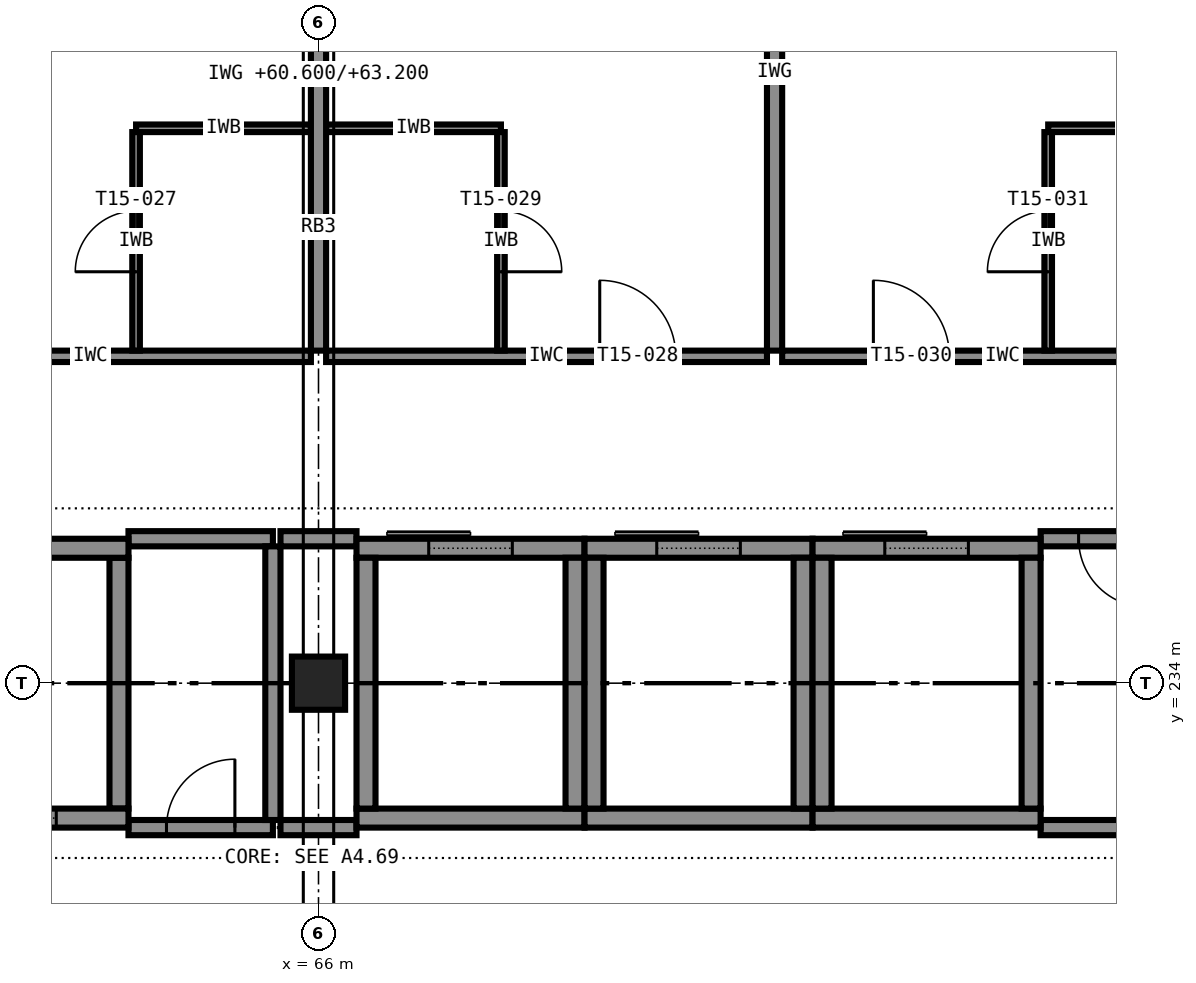
"""IFC4 building model, lengths in metres.
Left out: names, types, materials, properties, quantities, classifications, styles, units other than length and angle.
Written with IfcOpenShell. Run it as: python <this file> out.ifc"""

import sys

from ifc_helpers import new_model, si_unit, direction, frame, frame_2d, origin, origin_2d, place, context, subcontext, project, spatial, rectangle, extrude, element, fill, save


model = new_model("IFC4")
c1 = context("Model", 3, precision=1e-05, world=origin(), true_north=direction((0.0, 1.0)))
c2 = subcontext(c1, "Body", "Model", "MODEL_VIEW")
j1 = project(units=[si_unit("LENGTHUNIT", "METRE"), si_unit("PLANEANGLEUNIT", "RADIAN")], contexts=[c1])
p1 = place(None, origin())
s1 = spatial("IfcSite", under=j1, at=p1, CompositionType="ELEMENT")
p2 = place(p1, origin())
s2 = spatial("IfcBuilding", under=s1, at=p2, CompositionType="ELEMENT")
p3 = place(p2, frame((0.0, 0.0, 60.6)))
s3 = spatial("IfcBuildingStorey", under=s2, at=p3, CompositionType="ELEMENT", Elevation=60.6)
p4 = place(p3, frame((66.0, 234.0, 0.0), z_axis=(0.0, 0.0, 1.0), x_axis=(1.0, 0.0, 0.0)))
e1 = element("IfcColumn", 1, at=p4, inside=s3, PredefinedType="COLUMN", context=c2, shape_type="SweptSolid", body=[
    extrude(rectangle(XDim=0.7, YDim=0.7, at=origin_2d()), origin(), (0.0, 0.0, 1.0), 3.6),
])
p5 = place(p3, frame((60.5, 232.225, 0.0), z_axis=(0.0, 0.0, 1.0), x_axis=(1.0, 0.0, 0.0)))
e2 = element("IfcWall", 2, at=p5, inside=s3, PredefinedType="SHEAR", context=c2, shape_type="SweptSolid", body=[
    extrude(rectangle(XDim=3.0, YDim=0.25, at=frame_2d((1.5, 0.0))), origin(), (0.0, 0.0, 1.0), 3.6),
])
p6 = place(p5, frame((0.95, 0.0, 0.0)))
e3 = element("IfcOpeningElement", 3, at=p6, cuts=e2, PredefinedType="OPENING", context=c2, shape_type="SweptSolid", body=[
    extrude(rectangle(XDim=1.1, YDim=2.1, at=frame_2d((0.55, 1.05))), frame((0.0, 0.135, 0.0), z_axis=(0.0, -1.0, 0.0), x_axis=(1.0, 0.0, 0.0)), (0.0, 0.0, 1.0), 0.27),
])
p7 = place(p3, frame((60.5, 235.775, 0.0), z_axis=(0.0, 0.0, 1.0), x_axis=(1.0, 0.0, 0.0)))
e4 = element("IfcWall", 4, at=p7, inside=s3, PredefinedType="SHEAR", context=c2, shape_type="SweptSolid", body=[
    extrude(rectangle(XDim=3.0, YDim=0.25, at=frame_2d((1.5, 0.0))), origin(), (0.0, 0.0, 1.0), 3.6),
])
p8 = place(p3, frame((63.375, 232.35, 0.0), z_axis=(0.0, 0.0, 1.0), x_axis=(0.0, 1.0, 0.0)))
e5 = element("IfcWall", 5, at=p8, inside=s3, PredefinedType="SHEAR", context=c2, shape_type="SweptSolid", body=[
    extrude(rectangle(XDim=3.3, YDim=0.25, at=frame_2d((1.65, 0.0))), origin(), (0.0, 0.0, 1.0), 3.6),
])
p9 = place(p3, frame((66.5, 232.225, 0.0), z_axis=(0.0, 0.0, 1.0), x_axis=(1.0, 0.0, 0.0)))
e6 = element("IfcWall", 6, at=p9, inside=s3, PredefinedType="SHEAR", context=c2, shape_type="SweptSolid", body=[
    extrude(rectangle(XDim=3.0, YDim=0.25, at=frame_2d((1.5, 0.0))), origin(), (0.0, 0.0, 1.0), 3.6),
])
p10 = place(p3, frame((66.5, 235.775, 0.0), z_axis=(0.0, 0.0, 1.0), x_axis=(1.0, 0.0, 0.0)))
e7 = element("IfcWall", 7, at=p10, inside=s3, PredefinedType="SHEAR", context=c2, shape_type="SweptSolid", body=[
    extrude(rectangle(XDim=3.0, YDim=0.25, at=frame_2d((1.5, 0.0))), origin(), (0.0, 0.0, 1.0), 3.6),
])
p11 = place(p10, frame((0.95, 0.0, 0.0)))
e8 = element("IfcOpeningElement", 8, at=p11, cuts=e7, PredefinedType="OPENING", context=c2, shape_type="SweptSolid", body=[
    extrude(rectangle(XDim=1.1, YDim=2.1, at=frame_2d((0.55, 1.05))), frame((0.0, 0.135, 0.0), z_axis=(0.0, -1.0, 0.0), x_axis=(1.0, 0.0, 0.0)), (0.0, 0.0, 1.0), 0.27),
])
for number, where, z_axis, x_axis in (
    (9, (66.625, 232.35, 0.0), (0.0, 0.0, 1.0), (0.0, 1.0, 0.0)),
    (10, (69.375, 232.35, 0.0), (0.0, 0.0, 1.0), (0.0, 1.0, 0.0)),
):
    element("IfcWall", number, at=place(p3, frame(where, z_axis=z_axis, x_axis=x_axis)), inside=s3, PredefinedType="SHEAR", context=c2, shape_type="SweptSolid", body=[
        extrude(rectangle(XDim=3.3, YDim=0.25, at=frame_2d((1.65, 0.0))), origin(), (0.0, 0.0, 1.0), 3.6),
    ])
p12 = place(p3, frame((69.5, 232.225, 0.0), z_axis=(0.0, 0.0, 1.0), x_axis=(1.0, 0.0, 0.0)))
e11 = element("IfcWall", 11, at=p12, inside=s3, PredefinedType="SHEAR", context=c2, shape_type="SweptSolid", body=[
    extrude(rectangle(XDim=3.0, YDim=0.25, at=frame_2d((1.5, 0.0))), origin(), (0.0, 0.0, 1.0), 3.6),
])
p13 = place(p3, frame((69.5, 235.775, 0.0), z_axis=(0.0, 0.0, 1.0), x_axis=(1.0, 0.0, 0.0)))
e12 = element("IfcWall", 12, at=p13, inside=s3, PredefinedType="SHEAR", context=c2, shape_type="SweptSolid", body=[
    extrude(rectangle(XDim=3.0, YDim=0.25, at=frame_2d((1.5, 0.0))), origin(), (0.0, 0.0, 1.0), 3.6),
])
p14 = place(p13, frame((0.95, 0.0, 0.0)))
e13 = element("IfcOpeningElement", 13, at=p14, cuts=e12, PredefinedType="OPENING", context=c2, shape_type="SweptSolid", body=[
    extrude(rectangle(XDim=1.1, YDim=2.1, at=frame_2d((0.55, 1.05))), frame((0.0, 0.135, 0.0), z_axis=(0.0, -1.0, 0.0), x_axis=(1.0, 0.0, 0.0)), (0.0, 0.0, 1.0), 0.27),
])
for number, where, z_axis, x_axis in (
    (14, (69.625, 232.35, 0.0), (0.0, 0.0, 1.0), (0.0, 1.0, 0.0)),
    (15, (72.375, 232.35, 0.0), (0.0, 0.0, 1.0), (0.0, 1.0, 0.0)),
):
    element("IfcWall", number, at=place(p3, frame(where, z_axis=z_axis, x_axis=x_axis)), inside=s3, PredefinedType="SHEAR", context=c2, shape_type="SweptSolid", body=[
        extrude(rectangle(XDim=3.3, YDim=0.25, at=frame_2d((1.65, 0.0))), origin(), (0.0, 0.0, 1.0), 3.6),
    ])
p15 = place(p3, frame((72.5, 232.225, 0.0), z_axis=(0.0, 0.0, 1.0), x_axis=(1.0, 0.0, 0.0)))
e16 = element("IfcWall", 16, at=p15, inside=s3, PredefinedType="SHEAR", context=c2, shape_type="SweptSolid", body=[
    extrude(rectangle(XDim=3.0, YDim=0.25, at=frame_2d((1.5, 0.0))), origin(), (0.0, 0.0, 1.0), 3.6),
])
p16 = place(p3, frame((72.5, 235.775, 0.0), z_axis=(0.0, 0.0, 1.0), x_axis=(1.0, 0.0, 0.0)))
e17 = element("IfcWall", 17, at=p16, inside=s3, PredefinedType="SHEAR", context=c2, shape_type="SweptSolid", body=[
    extrude(rectangle(XDim=3.0, YDim=0.25, at=frame_2d((1.5, 0.0))), origin(), (0.0, 0.0, 1.0), 3.6),
])
p17 = place(p16, frame((0.95, 0.0, 0.0)))
e18 = element("IfcOpeningElement", 18, at=p17, cuts=e17, PredefinedType="OPENING", context=c2, shape_type="SweptSolid", body=[
    extrude(rectangle(XDim=1.1, YDim=2.1, at=frame_2d((0.55, 1.05))), frame((0.0, 0.135, 0.0), z_axis=(0.0, -1.0, 0.0), x_axis=(1.0, 0.0, 0.0)), (0.0, 0.0, 1.0), 0.27),
])
for number, where, z_axis, x_axis in (
    (19, (72.625, 232.35, 0.0), (0.0, 0.0, 1.0), (0.0, 1.0, 0.0)),
    (20, (75.375, 232.35, 0.0), (0.0, 0.0, 1.0), (0.0, 1.0, 0.0)),
):
    element("IfcWall", number, at=place(p3, frame(where, z_axis=z_axis, x_axis=x_axis)), inside=s3, PredefinedType="SHEAR", context=c2, shape_type="SweptSolid", body=[
        extrude(rectangle(XDim=3.3, YDim=0.25, at=frame_2d((1.65, 0.0))), origin(), (0.0, 0.0, 1.0), 3.6),
    ])
p18 = place(p3, frame((63.5, 232.1, 0.0), z_axis=(0.0, 0.0, 1.0), x_axis=(1.0, 0.0, 0.0)))
e21 = element("IfcWall", 21, at=p18, inside=s3, PredefinedType="PARTITIONING", context=c2, shape_type="SweptSolid", body=[
    extrude(rectangle(XDim=1.9, YDim=0.2, at=frame_2d((0.95, 0.0))), origin(), (0.0, 0.0, 1.0), 3.4),
])
p19 = place(p18, frame((0.5, 0.0, 0.0)))
e22 = element("IfcOpeningElement", 22, at=p19, cuts=e21, PredefinedType="OPENING", context=c2, shape_type="SweptSolid", body=[
    extrude(rectangle(XDim=0.9, YDim=2.1, at=frame_2d((0.45, 1.05))), frame((0.0, 0.11, 0.0), z_axis=(0.0, -1.0, 0.0), x_axis=(1.0, 0.0, 0.0)), (0.0, 0.0, 1.0), 0.22),
])
p20 = place(p3, frame((65.5, 232.1, 0.0), z_axis=(0.0, 0.0, 1.0), x_axis=(1.0, 0.0, 0.0)))
e23 = element("IfcWall", 23, at=p20, inside=s3, PredefinedType="PARTITIONING", context=c2, shape_type="SweptSolid", body=[
    extrude(rectangle(XDim=1.0, YDim=0.2, at=frame_2d((0.5, 0.0))), origin(), (0.0, 0.0, 1.0), 3.4),
])
for number, where, z_axis, x_axis in (
    (24, (75.5, 232.1, 0.0), (0.0, 0.0, 1.0), (1.0, 0.0, 0.0)),
    (25, (63.5, 235.9, 0.0), (0.0, 0.0, 1.0), (1.0, 0.0, 0.0)),
):
    element("IfcWall", number, at=place(p3, frame(where, z_axis=z_axis, x_axis=x_axis)), inside=s3, PredefinedType="PARTITIONING", context=c2, shape_type="SweptSolid", body=[
        extrude(rectangle(XDim=1.9, YDim=0.2, at=frame_2d((0.95, 0.0))), origin(), (0.0, 0.0, 1.0), 3.4),
    ])
p21 = place(p3, frame((65.5, 235.9, 0.0), z_axis=(0.0, 0.0, 1.0), x_axis=(1.0, 0.0, 0.0)))
e26 = element("IfcWall", 26, at=p21, inside=s3, PredefinedType="PARTITIONING", context=c2, shape_type="SweptSolid", body=[
    extrude(rectangle(XDim=1.0, YDim=0.2, at=frame_2d((0.5, 0.0))), origin(), (0.0, 0.0, 1.0), 3.4),
])
p22 = place(p3, frame((77.4, 235.9, 0.0), z_axis=(0.0, 0.0, 1.0), x_axis=(-1.0, 0.0, 0.0)))
e27 = element("IfcWall", 27, at=p22, inside=s3, PredefinedType="PARTITIONING", context=c2, shape_type="SweptSolid", body=[
    extrude(rectangle(XDim=1.9, YDim=0.2, at=frame_2d((0.95, 0.0))), origin(), (0.0, 0.0, 1.0), 3.4),
])
p23 = place(p22, frame((0.5, 0.0, 0.0)))
e28 = element("IfcOpeningElement", 28, at=p23, cuts=e27, PredefinedType="OPENING", context=c2, shape_type="SweptSolid", body=[
    extrude(rectangle(XDim=0.9, YDim=2.1, at=frame_2d((0.45, 1.05))), frame((0.0, 0.11, 0.0), z_axis=(0.0, -1.0, 0.0), x_axis=(1.0, 0.0, 0.0)), (0.0, 0.0, 1.0), 0.22),
])
p24 = place(p3, frame((65.4, 232.2, 0.0), z_axis=(0.0, 0.0, 1.0), x_axis=(0.0, 1.0, 0.0)))
e29 = element("IfcWall", 29, at=p24, inside=s3, PredefinedType="PARTITIONING", context=c2, shape_type="SweptSolid", body=[
    extrude(rectangle(XDim=3.6, YDim=0.2, at=frame_2d((1.8, 0.0))), origin(), (0.0, 0.0, 1.0), 3.4),
])
p25 = place(p3, frame((60.1, 238.3, 0.0), z_axis=(0.0, 0.0, 1.0), x_axis=(1.0, 0.0, 0.0)))
e30 = element("IfcWall", 30, at=p25, inside=s3, PredefinedType="PARTITIONING", context=c2, shape_type="SweptSolid", body=[
    extrude(rectangle(XDim=5.8, YDim=0.15, at=frame_2d((2.9, 0.0))), origin(), (0.0, 0.0, 1.0), 3.4),
])
p26 = place(p25, frame((1.2, 0.0, 0.0)))
e31 = element("IfcOpeningElement", 31, at=p26, cuts=e30, PredefinedType="OPENING", context=c2, shape_type="SweptSolid", body=[
    extrude(rectangle(XDim=1.0, YDim=2.1, at=frame_2d((0.5, 1.05))), frame((0.0, 0.085, 0.0), z_axis=(0.0, -1.0, 0.0), x_axis=(1.0, 0.0, 0.0)), (0.0, 0.0, 1.0), 0.17),
])
p27 = place(p3, frame((63.6, 241.3, 0.0), z_axis=(0.0, 0.0, 1.0), x_axis=(1.0, 0.0, 0.0)))
e32 = element("IfcWall", 32, at=p27, inside=s3, PredefinedType="PARTITIONING", context=c2, shape_type="SweptSolid", body=[
    extrude(rectangle(XDim=2.3, YDim=0.1, at=frame_2d((1.15, 0.0))), origin(), (0.0, 0.0, 1.0), 3.4),
])
p28 = place(p3, frame((63.6, 238.375, 0.0), z_axis=(0.0, 0.0, 1.0), x_axis=(0.0, 1.0, 0.0)))
e33 = element("IfcWall", 33, at=p28, inside=s3, PredefinedType="PARTITIONING", context=c2, shape_type="SweptSolid", body=[
    extrude(rectangle(XDim=2.875, YDim=0.1, at=frame_2d((1.438, 0.0))), origin(), (0.0, 0.0, 1.0), 3.4),
])
p29 = place(p28, frame((1.038, 0.0, 0.0)))
e34 = element("IfcOpeningElement", 34, at=p29, cuts=e33, PredefinedType="OPENING", context=c2, shape_type="SweptSolid", body=[
    extrude(rectangle(XDim=0.8, YDim=2.1, at=frame_2d((0.4, 1.05))), frame((0.0, 0.06, 0.0), z_axis=(0.0, -1.0, 0.0), x_axis=(1.0, 0.0, 0.0)), (0.0, 0.0, 1.0), 0.12),
])
p30 = place(p3, frame((66.1, 238.3, 0.0), z_axis=(0.0, 0.0, 1.0), x_axis=(1.0, 0.0, 0.0)))
e35 = element("IfcWall", 35, at=p30, inside=s3, PredefinedType="PARTITIONING", context=c2, shape_type="SweptSolid", body=[
    extrude(rectangle(XDim=5.8, YDim=0.15, at=frame_2d((2.9, 0.0))), origin(), (0.0, 0.0, 1.0), 3.4),
])
p31 = place(p30, frame((3.6, 0.0, 0.0)))
e36 = element("IfcOpeningElement", 36, at=p31, cuts=e35, PredefinedType="OPENING", context=c2, shape_type="SweptSolid", body=[
    extrude(rectangle(XDim=1.0, YDim=2.1, at=frame_2d((0.5, 1.05))), frame((0.0, 0.085, 0.0), z_axis=(0.0, -1.0, 0.0), x_axis=(1.0, 0.0, 0.0)), (0.0, 0.0, 1.0), 0.17),
])
p32 = place(p3, frame((66.1, 241.3, 0.0), z_axis=(0.0, 0.0, 1.0), x_axis=(1.0, 0.0, 0.0)))
e37 = element("IfcWall", 37, at=p32, inside=s3, PredefinedType="PARTITIONING", context=c2, shape_type="SweptSolid", body=[
    extrude(rectangle(XDim=2.3, YDim=0.1, at=frame_2d((1.15, 0.0))), origin(), (0.0, 0.0, 1.0), 3.4),
])
p33 = place(p3, frame((68.4, 241.25, 0.0), z_axis=(0.0, 0.0, 1.0), x_axis=(0.0, -1.0, 0.0)))
e38 = element("IfcWall", 38, at=p33, inside=s3, PredefinedType="PARTITIONING", context=c2, shape_type="SweptSolid", body=[
    extrude(rectangle(XDim=2.875, YDim=0.1, at=frame_2d((1.438, 0.0))), origin(), (0.0, 0.0, 1.0), 3.4),
])
p34 = place(p33, frame((1.038, 0.0, 0.0)))
e39 = element("IfcOpeningElement", 39, at=p34, cuts=e38, PredefinedType="OPENING", context=c2, shape_type="SweptSolid", body=[
    extrude(rectangle(XDim=0.8, YDim=2.1, at=frame_2d((0.4, 1.05))), frame((0.0, 0.06, 0.0), z_axis=(0.0, -1.0, 0.0), x_axis=(1.0, 0.0, 0.0)), (0.0, 0.0, 1.0), 0.12),
])
p35 = place(p3, frame((72.1, 238.3, 0.0), z_axis=(0.0, 0.0, 1.0), x_axis=(1.0, 0.0, 0.0)))
e40 = element("IfcWall", 40, at=p35, inside=s3, PredefinedType="PARTITIONING", context=c2, shape_type="SweptSolid", body=[
    extrude(rectangle(XDim=5.8, YDim=0.15, at=frame_2d((2.9, 0.0))), origin(), (0.0, 0.0, 1.0), 3.4),
])
p36 = place(p35, frame((1.2, 0.0, 0.0)))
e41 = element("IfcOpeningElement", 41, at=p36, cuts=e40, PredefinedType="OPENING", context=c2, shape_type="SweptSolid", body=[
    extrude(rectangle(XDim=1.0, YDim=2.1, at=frame_2d((0.5, 1.05))), frame((0.0, 0.085, 0.0), z_axis=(0.0, -1.0, 0.0), x_axis=(1.0, 0.0, 0.0)), (0.0, 0.0, 1.0), 0.17),
])
p37 = place(p3, frame((75.6, 241.3, 0.0), z_axis=(0.0, 0.0, 1.0), x_axis=(1.0, 0.0, 0.0)))
e42 = element("IfcWall", 42, at=p37, inside=s3, PredefinedType="PARTITIONING", context=c2, shape_type="SweptSolid", body=[
    extrude(rectangle(XDim=2.3, YDim=0.1, at=frame_2d((1.15, 0.0))), origin(), (0.0, 0.0, 1.0), 3.4),
])
p38 = place(p3, frame((75.6, 238.375, 0.0), z_axis=(0.0, 0.0, 1.0), x_axis=(0.0, 1.0, 0.0)))
e43 = element("IfcWall", 43, at=p38, inside=s3, PredefinedType="PARTITIONING", context=c2, shape_type="SweptSolid", body=[
    extrude(rectangle(XDim=2.875, YDim=0.1, at=frame_2d((1.438, 0.0))), origin(), (0.0, 0.0, 1.0), 3.4),
])
p39 = place(p38, frame((1.038, 0.0, 0.0)))
e44 = element("IfcOpeningElement", 44, at=p39, cuts=e43, PredefinedType="OPENING", context=c2, shape_type="SweptSolid", body=[
    extrude(rectangle(XDim=0.8, YDim=2.1, at=frame_2d((0.4, 1.05))), frame((0.0, 0.06, 0.0), z_axis=(0.0, -1.0, 0.0), x_axis=(1.0, 0.0, 0.0)), (0.0, 0.0, 1.0), 0.12),
])
p40 = place(p3, frame((66.0, 245.65, 0.0), z_axis=(0.0, 0.0, 1.0), x_axis=(0.0, -1.0, 0.0)))
e45 = element("IfcWall", 45, at=p40, inside=s3, PredefinedType="PARTITIONING", context=c2, shape_type="SweptSolid", body=[
    extrude(rectangle(XDim=7.275, YDim=0.2, at=frame_2d((3.637, 0.0))), origin(), (0.0, 0.0, 1.0), 2.6),
])
p41 = place(p3, frame((72.0, 245.7, 0.0), z_axis=(0.0, 0.0, 1.0), x_axis=(0.0, -1.0, 0.0)))
e46 = element("IfcWall", 46, at=p41, inside=s3, PredefinedType="PARTITIONING", context=c2, shape_type="SweptSolid", body=[
    extrude(rectangle(XDim=7.325, YDim=0.2, at=frame_2d((3.663, 0.0))), origin(), (0.0, 0.0, 1.0), 3.4),
])
p42 = place(p19, origin())
e47 = element("IfcDoor", 47, at=p42, inside=s3, OperationType="SINGLE_SWING_RIGHT", PredefinedType="DOOR", context=c2, shape_type="SweptSolid", body=[
    extrude(rectangle(XDim=0.9, YDim=2.1, at=frame_2d((0.45, 1.05))), frame((0.0, 0.025, 0.0), z_axis=(0.0, -1.0, 0.0), x_axis=(1.0, 0.0, 0.0)), (0.0, 0.0, 1.0), 0.05),
])
fill(e22, e47)
p43 = place(p23, origin())
e48 = element("IfcDoor", 48, at=p43, inside=s3, OperationType="SINGLE_SWING_LEFT", PredefinedType="DOOR", context=c2, shape_type="SweptSolid", body=[
    extrude(rectangle(XDim=0.9, YDim=2.1, at=frame_2d((0.45, 1.05))), frame((0.0, 0.025, 0.0), z_axis=(0.0, -1.0, 0.0), x_axis=(1.0, 0.0, 0.0)), (0.0, 0.0, 1.0), 0.05),
])
fill(e28, e48)
p44 = place(p29, origin())
e49 = element("IfcDoor", 49, at=p44, inside=s3, OperationType="SINGLE_SWING_LEFT", PredefinedType="DOOR", context=c2, shape_type="SweptSolid", body=[
    extrude(rectangle(XDim=0.8, YDim=2.1, at=frame_2d((0.4, 1.05))), frame((0.0, 0.025, 0.0), z_axis=(0.0, -1.0, 0.0), x_axis=(1.0, 0.0, 0.0)), (0.0, 0.0, 1.0), 0.05),
])
fill(e34, e49)
p45 = place(p31, origin())
e50 = element("IfcDoor", 50, at=p45, inside=s3, OperationType="SINGLE_SWING_LEFT", PredefinedType="DOOR", context=c2, shape_type="SweptSolid", body=[
    extrude(rectangle(XDim=1.0, YDim=2.1, at=frame_2d((0.5, 1.05))), frame((0.0, 0.025, 0.0), z_axis=(0.0, -1.0, 0.0), x_axis=(1.0, 0.0, 0.0)), (0.0, 0.0, 1.0), 0.05),
])
fill(e36, e50)
p46 = place(p34, origin())
e51 = element("IfcDoor", 51, at=p46, inside=s3, OperationType="SINGLE_SWING_RIGHT", PredefinedType="DOOR", context=c2, shape_type="SweptSolid", body=[
    extrude(rectangle(XDim=0.8, YDim=2.1, at=frame_2d((0.4, 1.05))), frame((0.0, 0.025, 0.0), z_axis=(0.0, -1.0, 0.0), x_axis=(1.0, 0.0, 0.0)), (0.0, 0.0, 1.0), 0.05),
])
fill(e39, e51)
p47 = place(p36, origin())
e52 = element("IfcDoor", 52, at=p47, inside=s3, OperationType="SINGLE_SWING_LEFT", PredefinedType="DOOR", context=c2, shape_type="SweptSolid", body=[
    extrude(rectangle(XDim=1.0, YDim=2.1, at=frame_2d((0.5, 1.05))), frame((0.0, 0.025, 0.0), z_axis=(0.0, -1.0, 0.0), x_axis=(1.0, 0.0, 0.0)), (0.0, 0.0, 1.0), 0.05),
])
fill(e41, e52)
p48 = place(p39, origin())
e53 = element("IfcDoor", 53, at=p48, inside=s3, OperationType="SINGLE_SWING_LEFT", PredefinedType="DOOR", context=c2, shape_type="SweptSolid", body=[
    extrude(rectangle(XDim=0.8, YDim=2.1, at=frame_2d((0.4, 1.05))), frame((0.0, 0.025, 0.0), z_axis=(0.0, -1.0, 0.0), x_axis=(1.0, 0.0, 0.0)), (0.0, 0.0, 1.0), 0.05),
])
fill(e44, e53)
p49 = place(p6, origin())
e54 = element("IfcDoor", 54, at=p49, inside=s3, OperationType="SLIDING_TO_LEFT", PredefinedType="DOOR", context=c2, shape_type="SweptSolid", body=[
    extrude(rectangle(XDim=1.1, YDim=2.1, at=frame_2d((0.55, 1.05))), frame((0.0, 0.025, 0.0), z_axis=(0.0, -1.0, 0.0), x_axis=(1.0, 0.0, 0.0)), (0.0, 0.0, 1.0), 0.05),
])
fill(e3, e54)
p50 = place(p11, origin())
e55 = element("IfcDoor", 55, at=p50, inside=s3, OperationType="SLIDING_TO_LEFT", PredefinedType="DOOR", context=c2, shape_type="SweptSolid", body=[
    extrude(rectangle(XDim=1.1, YDim=2.1, at=frame_2d((0.55, 1.05))), frame((0.0, 0.025, 0.0), z_axis=(0.0, -1.0, 0.0), x_axis=(1.0, 0.0, 0.0)), (0.0, 0.0, 1.0), 0.05),
])
fill(e8, e55)
p51 = place(p14, origin())
e56 = element("IfcDoor", 56, at=p51, inside=s3, OperationType="SLIDING_TO_LEFT", PredefinedType="DOOR", context=c2, shape_type="SweptSolid", body=[
    extrude(rectangle(XDim=1.1, YDim=2.1, at=frame_2d((0.55, 1.05))), frame((0.0, 0.025, 0.0), z_axis=(0.0, -1.0, 0.0), x_axis=(1.0, 0.0, 0.0)), (0.0, 0.0, 1.0), 0.05),
])
fill(e13, e56)
p52 = place(p17, origin())
e57 = element("IfcDoor", 57, at=p52, inside=s3, OperationType="SLIDING_TO_LEFT", PredefinedType="DOOR", context=c2, shape_type="SweptSolid", body=[
    extrude(rectangle(XDim=1.1, YDim=2.1, at=frame_2d((0.55, 1.05))), frame((0.0, 0.025, 0.0), z_axis=(0.0, -1.0, 0.0), x_axis=(1.0, 0.0, 0.0)), (0.0, 0.0, 1.0), 0.05),
])
fill(e18, e57)
save(model, sys.argv[1])
